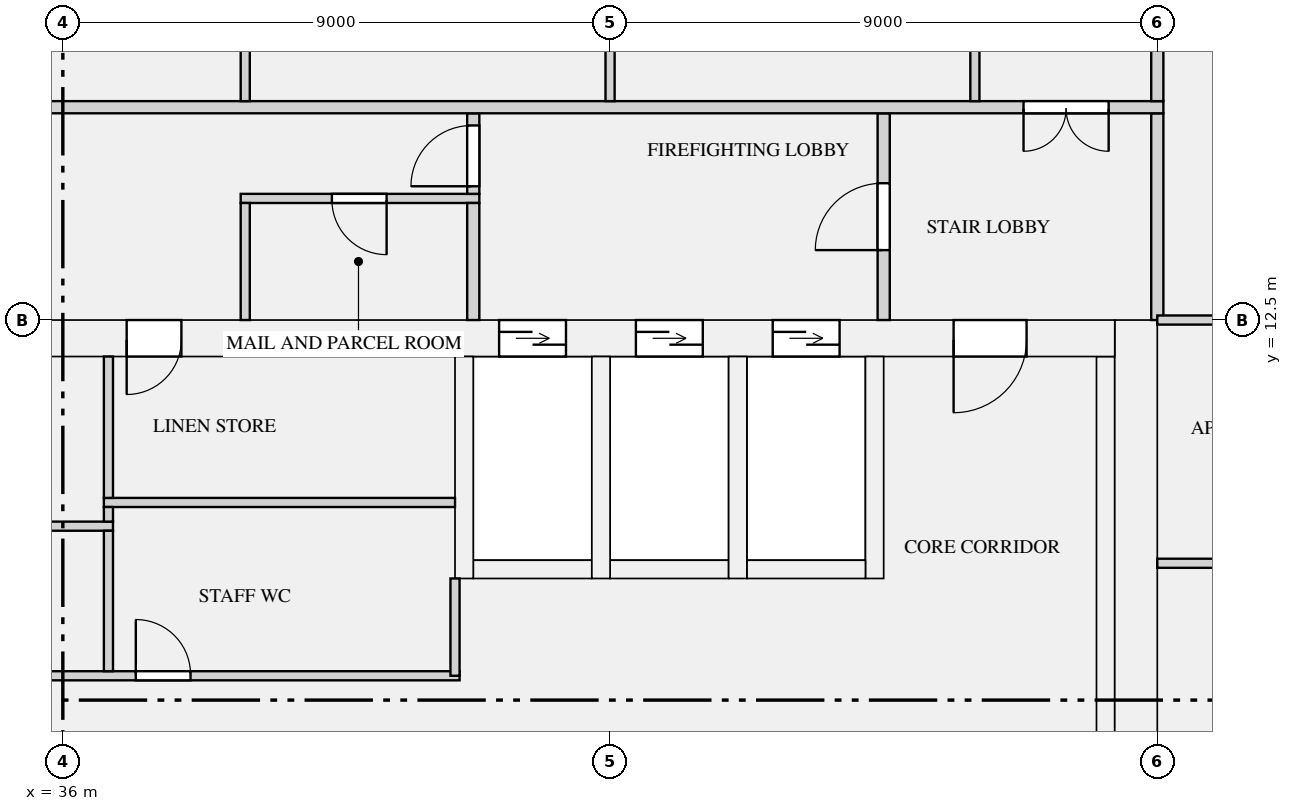
"""IFC4 building model, lengths in metres.
Left out: names, types, materials, properties, quantities, classifications, styles, units other than length and angle.
Written with IfcOpenShell. Run it as: python <this file> out.ifc"""

import sys

from ifc_helpers import new_model, si_unit, direction, frame, frame_2d, origin, place, context, subcontext, project, spatial, rectangle, extrude, element, fill, save


model = new_model("IFC4")
c1 = context("Model", 3, precision=1e-05, world=origin(), true_north=direction((0.0, 1.0)))
c2 = subcontext(c1, "Body", "Model", "MODEL_VIEW")
j1 = project(units=[si_unit("LENGTHUNIT", "METRE"), si_unit("PLANEANGLEUNIT", "RADIAN")], contexts=[c1])
p1 = place(None, origin())
s1 = spatial("IfcSite", under=j1, at=p1, CompositionType="ELEMENT")
p2 = place(p1, origin())
s2 = spatial("IfcBuilding", under=s1, at=p2, CompositionType="ELEMENT")
p3 = place(p2, frame((0.0, 0.0, 160.2)))
s3 = spatial("IfcBuildingStorey", under=s2, at=p3, CompositionType="ELEMENT", Elevation=160.2)
p4 = place(p3, frame((53.65, 0.0, 0.0), z_axis=(0.0, 0.0, 1.0), x_axis=(0.0, 1.0, 0.0)))
e1 = element("IfcWall", 1, at=p4, inside=s3, PredefinedType="SHEAR", context=c2, shape_type="SweptSolid", body=[
    extrude(rectangle(XDim=12.5, YDim=0.7, at=frame_2d((6.25, 0.0))), origin(), (0.0, 0.0, 1.0), 3.15),
])
p5 = place(p3, frame((18.7, 12.2, 0.0), z_axis=(0.0, 0.0, 1.0), x_axis=(1.0, 0.0, 0.0)))
e2 = element("IfcWall", 2, at=p5, inside=s3, PredefinedType="SHEAR", context=c2, shape_type="SweptSolid", body=[
    extrude(rectangle(XDim=34.6, YDim=0.6, at=frame_2d((17.3, 0.0))), origin(), (0.0, 0.0, 1.0), 3.15),
])
p6 = place(p5, frame((24.475, 0.0, 0.0)))
e3 = element("IfcOpeningElement", 3, at=p6, cuts=e2, PredefinedType="OPENING", context=c2, shape_type="SweptSolid", body=[
    extrude(rectangle(XDim=1.1, YDim=2.1, at=frame_2d((0.55, 1.05))), frame((0.0, 0.31, 0.0), z_axis=(0.0, -1.0, 0.0), x_axis=(1.0, 0.0, 0.0)), (0.0, 0.0, 1.0), 0.62),
])
p7 = place(p5, frame((26.725, 0.0, 0.0)))
e4 = element("IfcOpeningElement", 4, at=p7, cuts=e2, PredefinedType="OPENING", context=c2, shape_type="SweptSolid", body=[
    extrude(rectangle(XDim=1.1, YDim=2.1, at=frame_2d((0.55, 1.05))), frame((0.0, 0.31, 0.0), z_axis=(0.0, -1.0, 0.0), x_axis=(1.0, 0.0, 0.0)), (0.0, 0.0, 1.0), 0.62),
])
p8 = place(p5, frame((28.975, 0.0, 0.0)))
e5 = element("IfcOpeningElement", 5, at=p8, cuts=e2, PredefinedType="OPENING", context=c2, shape_type="SweptSolid", body=[
    extrude(rectangle(XDim=1.1, YDim=2.1, at=frame_2d((0.55, 1.05))), frame((0.0, 0.31, 0.0), z_axis=(0.0, -1.0, 0.0), x_axis=(1.0, 0.0, 0.0)), (0.0, 0.0, 1.0), 0.62),
])
p9 = place(p5, frame((4.85, 0.0, 0.0)))
e6 = element("IfcOpeningElement", 6, at=p9, cuts=e2, PredefinedType="OPENING", context=c2, shape_type="SweptSolid", body=[
    extrude(rectangle(XDim=0.9, YDim=2.1, at=frame_2d((0.45, 1.05))), frame((0.0, 0.31, 0.0), z_axis=(0.0, -1.0, 0.0), x_axis=(1.0, 0.0, 0.0)), (0.0, 0.0, 1.0), 0.62),
])
p10 = place(p5, frame((13.85, 0.0, 0.0)))
e7 = element("IfcOpeningElement", 7, at=p10, cuts=e2, PredefinedType="OPENING", context=c2, shape_type="SweptSolid", body=[
    extrude(rectangle(XDim=0.9, YDim=2.1, at=frame_2d((0.45, 1.05))), frame((0.0, 0.31, 0.0), z_axis=(0.0, -1.0, 0.0), x_axis=(1.0, 0.0, 0.0)), (0.0, 0.0, 1.0), 0.62),
])
p11 = place(p5, frame((18.35, 0.0, 0.0)))
e8 = element("IfcOpeningElement", 8, at=p11, cuts=e2, PredefinedType="OPENING", context=c2, shape_type="SweptSolid", body=[
    extrude(rectangle(XDim=0.9, YDim=2.1, at=frame_2d((0.45, 1.05))), frame((0.0, 0.31, 0.0), z_axis=(0.0, -1.0, 0.0), x_axis=(1.0, 0.0, 0.0)), (0.0, 0.0, 1.0), 0.62),
])
p12 = place(p5, frame((1.45, 0.0, 0.0)))
e9 = element("IfcOpeningElement", 9, at=p12, cuts=e2, PredefinedType="OPENING", context=c2, shape_type="SweptSolid", body=[
    extrude(rectangle(XDim=1.2, YDim=2.1, at=frame_2d((0.6, 1.05))), frame((0.0, 0.31, 0.0), z_axis=(0.0, -1.0, 0.0), x_axis=(1.0, 0.0, 0.0)), (0.0, 0.0, 1.0), 0.62),
])
p13 = place(p5, frame((31.95, 0.0, 0.0)))
e10 = element("IfcOpeningElement", 10, at=p13, cuts=e2, PredefinedType="OPENING", context=c2, shape_type="SweptSolid", body=[
    extrude(rectangle(XDim=1.2, YDim=2.1, at=frame_2d((0.6, 1.05))), frame((0.0, 0.31, 0.0), z_axis=(0.0, -1.0, 0.0), x_axis=(1.0, 0.0, 0.0)), (0.0, 0.0, 1.0), 0.62),
])
p14 = place(p3, frame((53.15, 1.0, 0.0), z_axis=(0.0, 0.0, 1.0), x_axis=(0.0, 1.0, 0.0)))
e11 = element("IfcWall", 11, at=p14, inside=s3, PredefinedType="SHEAR", context=c2, shape_type="SweptSolid", body=[
    extrude(rectangle(XDim=10.9, YDim=0.3, at=frame_2d((5.45, 0.0))), origin(), (0.0, 0.0, 1.0), 3.15),
])
p15 = place(p3, frame((42.75, 8.4, 0.0), z_axis=(0.0, 0.0, 1.0), x_axis=(1.0, 0.0, 0.0)))
e12 = element("IfcWall", 12, at=p15, inside=s3, PredefinedType="SHEAR", context=c2, shape_type="SweptSolid", body=[
    extrude(rectangle(XDim=1.95, YDim=0.3, at=frame_2d((0.975, 0.0))), origin(), (0.0, 0.0, 1.0), 3.15),
])
p16 = place(p3, frame((42.6, 8.25, 0.0), z_axis=(0.0, 0.0, 1.0), x_axis=(0.0, 1.0, 0.0)))
e13 = element("IfcWall", 13, at=p16, inside=s3, PredefinedType="SHEAR", context=c2, shape_type="SweptSolid", body=[
    extrude(rectangle(XDim=3.65, YDim=0.3, at=frame_2d((1.825, 0.0))), origin(), (0.0, 0.0, 1.0), 3.15),
])
p17 = place(p3, frame((45.0, 8.4, 0.0), z_axis=(0.0, 0.0, 1.0), x_axis=(1.0, 0.0, 0.0)))
e14 = element("IfcWall", 14, at=p17, inside=s3, PredefinedType="SHEAR", context=c2, shape_type="SweptSolid", body=[
    extrude(rectangle(XDim=1.95, YDim=0.3, at=frame_2d((0.975, 0.0))), origin(), (0.0, 0.0, 1.0), 3.15),
])
p18 = place(p3, frame((44.85, 8.25, 0.0), z_axis=(0.0, 0.0, 1.0), x_axis=(0.0, 1.0, 0.0)))
e15 = element("IfcWall", 15, at=p18, inside=s3, PredefinedType="SHEAR", context=c2, shape_type="SweptSolid", body=[
    extrude(rectangle(XDim=3.65, YDim=0.3, at=frame_2d((1.825, 0.0))), origin(), (0.0, 0.0, 1.0), 3.15),
])
p19 = place(p3, frame((47.25, 8.4, 0.0), z_axis=(0.0, 0.0, 1.0), x_axis=(1.0, 0.0, 0.0)))
e16 = element("IfcWall", 16, at=p19, inside=s3, PredefinedType="SHEAR", context=c2, shape_type="SweptSolid", body=[
    extrude(rectangle(XDim=1.95, YDim=0.3, at=frame_2d((0.975, 0.0))), origin(), (0.0, 0.0, 1.0), 3.15),
])
for number, where, z_axis, x_axis in (
    (17, (47.1, 8.25, 0.0), (0.0, 0.0, 1.0), (0.0, 1.0, 0.0)),
    (18, (49.35, 8.25, 0.0), (0.0, 0.0, 1.0), (0.0, 1.0, 0.0)),
):
    element("IfcWall", number, at=place(p3, frame(where, z_axis=z_axis, x_axis=x_axis)), inside=s3, PredefinedType="SHEAR", context=c2, shape_type="SweptSolid", body=[
        extrude(rectangle(XDim=3.65, YDim=0.3, at=frame_2d((1.825, 0.0))), origin(), (0.0, 0.0, 1.0), 3.15),
    ])
p20 = place(p3, frame((22.725, 6.65, 0.0), z_axis=(0.0, 0.0, 1.0), x_axis=(1.0, 0.0, 0.0)))
e19 = element("IfcWall", 19, at=p20, inside=s3, PredefinedType="PARTITIONING", context=c2, shape_type="SweptSolid", body=[
    extrude(rectangle(XDim=19.8, YDim=0.15, at=frame_2d((9.9, 0.0))), origin(), (0.0, 0.0, 1.0), 2.83),
])
p21 = place(p20, frame((0.825, 0.0, 0.0)))
e20 = element("IfcOpeningElement", 20, at=p21, cuts=e19, PredefinedType="OPENING", context=c2, shape_type="SweptSolid", body=[
    extrude(rectangle(XDim=0.9, YDim=2.1, at=frame_2d((0.45, 1.05))), frame((0.0, 0.085, 0.0), z_axis=(0.0, -1.0, 0.0), x_axis=(1.0, 0.0, 0.0)), (0.0, 0.0, 1.0), 0.17),
])
p22 = place(p20, frame((4.825, 0.0, 0.0)))
e21 = element("IfcOpeningElement", 21, at=p22, cuts=e19, PredefinedType="OPENING", context=c2, shape_type="SweptSolid", body=[
    extrude(rectangle(XDim=0.9, YDim=2.1, at=frame_2d((0.45, 1.05))), frame((0.0, 0.085, 0.0), z_axis=(0.0, -1.0, 0.0), x_axis=(1.0, 0.0, 0.0)), (0.0, 0.0, 1.0), 0.17),
])
p23 = place(p20, frame((9.825, 0.0, 0.0)))
e22 = element("IfcOpeningElement", 22, at=p23, cuts=e19, PredefinedType="OPENING", context=c2, shape_type="SweptSolid", body=[
    extrude(rectangle(XDim=0.9, YDim=2.1, at=frame_2d((0.45, 1.05))), frame((0.0, 0.085, 0.0), z_axis=(0.0, -1.0, 0.0), x_axis=(1.0, 0.0, 0.0)), (0.0, 0.0, 1.0), 0.17),
])
p24 = place(p20, frame((14.475, 0.0, 0.0)))
e23 = element("IfcOpeningElement", 23, at=p24, cuts=e19, PredefinedType="OPENING", context=c2, shape_type="SweptSolid", body=[
    extrude(rectangle(XDim=0.9, YDim=2.1, at=frame_2d((0.45, 1.05))), frame((0.0, 0.085, 0.0), z_axis=(0.0, -1.0, 0.0), x_axis=(1.0, 0.0, 0.0)), (0.0, 0.0, 1.0), 0.17),
])
p25 = place(p3, frame((22.725, 9.11, 0.0), z_axis=(0.0, 0.0, 1.0), x_axis=(1.0, 0.0, 0.0)))
e24 = element("IfcWall", 24, at=p25, inside=s3, PredefinedType="PARTITIONING", context=c2, shape_type="SweptSolid", body=[
    extrude(rectangle(XDim=14.1, YDim=0.15, at=frame_2d((7.05, 0.0))), origin(), (0.0, 0.0, 1.0), 2.83),
])
p26 = place(p3, frame((36.675, 9.5, 0.0), z_axis=(0.0, 0.0, 1.0), x_axis=(1.0, 0.0, 0.0)))
e25 = element("IfcWall", 25, at=p26, inside=s3, PredefinedType="PARTITIONING", context=c2, shape_type="SweptSolid", body=[
    extrude(rectangle(XDim=5.775, YDim=0.15, at=frame_2d((2.887, 0.0))), origin(), (0.0, 0.0, 1.0), 2.83),
])
p27 = place(p3, frame((38.925, 14.5, 0.0), z_axis=(0.0, 0.0, 1.0), x_axis=(1.0, 0.0, 0.0)))
e26 = element("IfcWall", 26, at=p27, inside=s3, PredefinedType="PARTITIONING", context=c2, shape_type="SweptSolid", body=[
    extrude(rectangle(XDim=3.925, YDim=0.15, at=frame_2d((1.962, 0.0))), origin(), (0.0, 0.0, 1.0), 2.83),
])
p28 = place(p27, frame((1.5, 0.0, 0.0)))
e27 = element("IfcOpeningElement", 27, at=p28, cuts=e26, PredefinedType="OPENING", context=c2, shape_type="SweptSolid", body=[
    extrude(rectangle(XDim=0.9, YDim=2.1, at=frame_2d((0.45, 1.05))), frame((0.0, 0.085, 0.0), z_axis=(0.0, -1.0, 0.0), x_axis=(1.0, 0.0, 0.0)), (0.0, 0.0, 1.0), 0.17),
])
p29 = place(p3, frame((42.45, 6.65, 0.0), z_axis=(0.0, 0.0, 1.0), x_axis=(0.0, 1.0, 0.0)))
e28 = element("IfcWall", 28, at=p29, inside=s3, PredefinedType="PARTITIONING", context=c2, shape_type="SweptSolid", body=[
    extrude(rectangle(XDim=1.6, YDim=0.15, at=frame_2d((0.8, 0.0))), origin(), (0.0, 0.0, 1.0), 2.83),
])
p30 = place(p3, frame((36.75, 6.725, 0.0), z_axis=(0.0, 0.0, 1.0), x_axis=(0.0, 1.0, 0.0)))
e29 = element("IfcWall", 29, at=p30, inside=s3, PredefinedType="PARTITIONING", context=c2, shape_type="SweptSolid", body=[
    extrude(rectangle(XDim=2.31, YDim=0.15, at=frame_2d((1.155, 0.0))), origin(), (0.0, 0.0, 1.0), 2.83),
])
p31 = place(p3, frame((36.75, 9.185, 0.0), z_axis=(0.0, 0.0, 1.0), x_axis=(0.0, 1.0, 0.0)))
e30 = element("IfcWall", 30, at=p31, inside=s3, PredefinedType="PARTITIONING", context=c2, shape_type="SweptSolid", body=[
    extrude(rectangle(XDim=0.24, YDim=0.15, at=frame_2d((0.12, 0.0))), origin(), (0.0, 0.0, 1.0), 2.83),
])
p32 = place(p3, frame((36.75, 9.575, 0.0), z_axis=(0.0, 0.0, 1.0), x_axis=(0.0, 1.0, 0.0)))
e31 = element("IfcWall", 31, at=p32, inside=s3, PredefinedType="PARTITIONING", context=c2, shape_type="SweptSolid", body=[
    extrude(rectangle(XDim=2.325, YDim=0.15, at=frame_2d((1.163, 0.0))), origin(), (0.0, 0.0, 1.0), 2.83),
])
p33 = place(p3, frame((39.0, 12.5, 0.0), z_axis=(0.0, 0.0, 1.0), x_axis=(0.0, 1.0, 0.0)))
e32 = element("IfcWall", 32, at=p33, inside=s3, PredefinedType="PARTITIONING", context=c2, shape_type="SweptSolid", body=[
    extrude(rectangle(XDim=1.925, YDim=0.15, at=frame_2d((0.962, 0.0))), origin(), (0.0, 0.0, 1.0), 2.83),
])
p34 = place(p3, frame((42.75, 12.5, 0.0), z_axis=(0.0, 0.0, 1.0), x_axis=(0.0, 1.0, 0.0)))
e33 = element("IfcWall", 33, at=p34, inside=s3, PredefinedType="PARTITIONING", context=c2, shape_type="SweptSolid", body=[
    extrude(rectangle(XDim=1.925, YDim=0.2, at=frame_2d((0.962, 0.0))), origin(), (0.0, 0.0, 1.0), 2.83),
])
p35 = place(p3, frame((49.5, 12.5, 0.0), z_axis=(0.0, 0.0, 1.0), x_axis=(0.0, 1.0, 0.0)))
e34 = element("IfcWall", 34, at=p35, inside=s3, PredefinedType="PARTITIONING", context=c2, shape_type="SweptSolid", body=[
    extrude(rectangle(XDim=3.4, YDim=0.2, at=frame_2d((1.7, 0.0))), origin(), (0.0, 0.0, 1.0), 2.83),
])
p36 = place(p35, frame((1.15, 0.0, 0.0)))
e35 = element("IfcOpeningElement", 35, at=p36, cuts=e34, PredefinedType="OPENING", context=c2, shape_type="SweptSolid", body=[
    extrude(rectangle(XDim=1.1, YDim=2.1, at=frame_2d((0.55, 1.05))), frame((0.0, 0.11, 0.0), z_axis=(0.0, -1.0, 0.0), x_axis=(1.0, 0.0, 0.0)), (0.0, 0.0, 1.0), 0.22),
])
p37 = place(p3, frame((54.0, 12.5, 0.0), z_axis=(0.0, 0.0, 1.0), x_axis=(0.0, 1.0, 0.0)))
e36 = element("IfcWall", 36, at=p37, inside=s3, PredefinedType="PARTITIONING", context=c2, shape_type="SweptSolid", body=[
    extrude(rectangle(XDim=3.4, YDim=0.2, at=frame_2d((1.7, 0.0))), origin(), (0.0, 0.0, 1.0), 2.83),
])
p38 = place(p3, frame((42.75, 14.575, 0.0), z_axis=(0.0, 0.0, 1.0), x_axis=(0.0, 1.0, 0.0)))
e37 = element("IfcWall", 37, at=p38, inside=s3, PredefinedType="PARTITIONING", context=c2, shape_type="SweptSolid", body=[
    extrude(rectangle(XDim=1.325, YDim=0.2, at=frame_2d((0.663, 0.0))), origin(), (0.0, 0.0, 1.0), 2.83),
])
p39 = place(p38, frame((0.125, 0.0, 0.0)))
e38 = element("IfcOpeningElement", 38, at=p39, cuts=e37, PredefinedType="OPENING", context=c2, shape_type="SweptSolid", body=[
    extrude(rectangle(XDim=1.0, YDim=2.1, at=frame_2d((0.5, 1.05))), frame((0.0, 0.11, 0.0), z_axis=(0.0, -1.0, 0.0), x_axis=(1.0, 0.0, 0.0)), (0.0, 0.0, 1.0), 0.22),
])
p40 = place(p3, frame((54.0, 8.5, 0.0), z_axis=(0.0, 0.0, 1.0), x_axis=(1.0, 0.0, 0.0)))
e39 = element("IfcWall", 39, at=p40, inside=s3, PredefinedType="PARTITIONING", context=c2, shape_type="SweptSolid", body=[
    extrude(rectangle(XDim=17.3, YDim=0.15, at=frame_2d((8.65, 0.0))), origin(), (0.0, 0.0, 1.0), 2.83),
])
p41 = place(p40, frame((3.75, 0.0, 0.0)))
e40 = element("IfcOpeningElement", 40, at=p41, cuts=e39, PredefinedType="OPENING", context=c2, shape_type="SweptSolid", body=[
    extrude(rectangle(XDim=1.5, YDim=2.1, at=frame_2d((0.75, 1.05))), frame((0.0, 0.085, 0.0), z_axis=(0.0, -1.0, 0.0), x_axis=(1.0, 0.0, 0.0)), (0.0, 0.0, 1.0), 0.17),
])
p42 = place(p40, frame((10.8, 0.0, 0.0)))
e41 = element("IfcOpeningElement", 41, at=p42, cuts=e39, PredefinedType="OPENING", context=c2, shape_type="SweptSolid", body=[
    extrude(rectangle(XDim=0.9, YDim=2.1, at=frame_2d((0.45, 1.05))), frame((0.0, 0.085, 0.0), z_axis=(0.0, -1.0, 0.0), x_axis=(1.0, 0.0, 0.0)), (0.0, 0.0, 1.0), 0.17),
])
p43 = place(p3, frame((54.0, 12.5, 0.0), z_axis=(0.0, 0.0, 1.0), x_axis=(1.0, 0.0, 0.0)))
e42 = element("IfcWall", 42, at=p43, inside=s3, PredefinedType="PARTITIONING", context=c2, shape_type="SweptSolid", body=[
    extrude(rectangle(XDim=17.3, YDim=0.15, at=frame_2d((8.65, 0.0))), origin(), (0.0, 0.0, 1.0), 2.83),
])
p44 = place(p43, frame((1.5, 0.0, 0.0)))
e43 = element("IfcOpeningElement", 43, at=p44, cuts=e42, PredefinedType="OPENING", context=c2, shape_type="SweptSolid", body=[
    extrude(rectangle(XDim=1.5, YDim=2.1, at=frame_2d((0.75, 1.05))), frame((0.0, 0.085, 0.0), z_axis=(0.0, -1.0, 0.0), x_axis=(1.0, 0.0, 0.0)), (0.0, 0.0, 1.0), 0.17),
])
p45 = place(p43, frame((12.75, 0.0, 0.0)))
e44 = element("IfcOpeningElement", 44, at=p45, cuts=e42, PredefinedType="OPENING", context=c2, shape_type="SweptSolid", body=[
    extrude(rectangle(XDim=1.5, YDim=2.1, at=frame_2d((0.75, 1.05))), frame((0.0, 0.085, 0.0), z_axis=(0.0, -1.0, 0.0), x_axis=(1.0, 0.0, 0.0)), (0.0, 0.0, 1.0), 0.17),
])
p46 = place(p3, frame((17.9, 16.0, 0.0), z_axis=(0.0, 0.0, 1.0), x_axis=(1.0, 0.0, 0.0)))
e45 = element("IfcWall", 45, at=p46, inside=s3, PredefinedType="PARTITIONING", context=c2, shape_type="SweptSolid", body=[
    extrude(rectangle(XDim=36.2, YDim=0.2, at=frame_2d((18.1, 0.0))), origin(), (0.0, 0.0, 1.0), 2.83),
])
p47 = place(p46, frame((0.9, 0.0, 0.0)))
e46 = element("IfcOpeningElement", 46, at=p47, cuts=e45, PredefinedType="OPENING", context=c2, shape_type="SweptSolid", body=[
    extrude(rectangle(XDim=1.4, YDim=2.1, at=frame_2d((0.7, 1.05))), frame((0.0, 0.11, 0.0), z_axis=(0.0, -1.0, 0.0), x_axis=(1.0, 0.0, 0.0)), (0.0, 0.0, 1.0), 0.22),
])
p48 = place(p46, frame((33.9, 0.0, 0.0)))
e47 = element("IfcOpeningElement", 47, at=p48, cuts=e45, PredefinedType="OPENING", context=c2, shape_type="SweptSolid", body=[
    extrude(rectangle(XDim=1.4, YDim=2.1, at=frame_2d((0.7, 1.05))), frame((0.0, 0.11, 0.0), z_axis=(0.0, -1.0, 0.0), x_axis=(1.0, 0.0, 0.0)), (0.0, 0.0, 1.0), 0.22),
])
p49 = place(p3, frame((54.0, 16.1, 0.0), z_axis=(0.0, 0.0, 1.0), x_axis=(0.0, 1.0, 0.0)))
e48 = element("IfcWall", 48, at=p49, inside=s3, PredefinedType="PARTITIONING", context=c2, shape_type="SweptSolid", body=[
    extrude(rectangle(XDim=7.8, YDim=0.2, at=frame_2d((3.9, 0.0))), origin(), (0.0, 0.0, 1.0), 2.83),
])
p50 = place(p49, frame((1.85, 0.0, 0.0)))
e49 = element("IfcOpeningElement", 49, at=p50, cuts=e48, PredefinedType="OPENING", context=c2, shape_type="SweptSolid", body=[
    extrude(rectangle(XDim=1.1, YDim=2.1, at=frame_2d((0.55, 1.05))), frame((0.0, 0.11, 0.0), z_axis=(0.0, -1.0, 0.0), x_axis=(1.0, 0.0, 0.0)), (0.0, 0.0, 1.0), 0.22),
])
for number, where, z_axis, x_axis in (
    (50, (51.0, 16.1, 0.0), (0.0, 0.0, 1.0), (0.0, 1.0, 0.0)),
    (51, (39.0, 16.1, 0.0), (0.0, 0.0, 1.0), (0.0, 1.0, 0.0)),
    (52, (45.0, 16.1, 0.0), (0.0, 0.0, 1.0), (0.0, 1.0, 0.0)),
):
    element("IfcWall", number, at=place(p3, frame(where, z_axis=z_axis, x_axis=x_axis)), inside=s3, PredefinedType="PARTITIONING", context=c2, shape_type="SweptSolid", body=[
        extrude(rectangle(XDim=4.825, YDim=0.15, at=frame_2d((2.413, 0.0))), origin(), (0.0, 0.0, 1.0), 2.83),
    ])
p51 = place(p6, origin())
e53 = element("IfcDoor", 53, at=p51, inside=s3, OperationType="DOUBLE_DOOR_SLIDING", PredefinedType="DOOR", context=c2, shape_type="SweptSolid", body=[
    extrude(rectangle(XDim=1.1, YDim=2.1, at=frame_2d((0.55, 1.05))), frame((0.0, 0.025, 0.0), z_axis=(0.0, -1.0, 0.0), x_axis=(1.0, 0.0, 0.0)), (0.0, 0.0, 1.0), 0.05),
])
fill(e3, e53)
p52 = place(p7, origin())
e54 = element("IfcDoor", 54, at=p52, inside=s3, OperationType="DOUBLE_DOOR_SLIDING", PredefinedType="DOOR", context=c2, shape_type="SweptSolid", body=[
    extrude(rectangle(XDim=1.1, YDim=2.1, at=frame_2d((0.55, 1.05))), frame((0.0, 0.025, 0.0), z_axis=(0.0, -1.0, 0.0), x_axis=(1.0, 0.0, 0.0)), (0.0, 0.0, 1.0), 0.05),
])
fill(e4, e54)
p53 = place(p8, origin())
e55 = element("IfcDoor", 55, at=p53, inside=s3, OperationType="DOUBLE_DOOR_SLIDING", PredefinedType="DOOR", context=c2, shape_type="SweptSolid", body=[
    extrude(rectangle(XDim=1.1, YDim=2.1, at=frame_2d((0.55, 1.05))), frame((0.0, 0.025, 0.0), z_axis=(0.0, -1.0, 0.0), x_axis=(1.0, 0.0, 0.0)), (0.0, 0.0, 1.0), 0.05),
])
fill(e5, e55)
p54 = place(p28, frame((0.9, 0.0, 0.0), z_axis=(0.0, 0.0, 1.0), x_axis=(-1.0, 0.0, 0.0)))
e56 = element("IfcDoor", 56, at=p54, inside=s3, OperationType="SINGLE_SWING_LEFT", PredefinedType="DOOR", context=c2, shape_type="SweptSolid", body=[
    extrude(rectangle(XDim=0.9, YDim=2.1, at=frame_2d((0.45, 1.05))), frame((0.0, 0.025, 0.0), z_axis=(0.0, -1.0, 0.0), x_axis=(1.0, 0.0, 0.0)), (0.0, 0.0, 1.0), 0.05),
])
fill(e27, e56)
p55 = place(p24, origin())
e57 = element("IfcDoor", 57, at=p55, inside=s3, OperationType="SINGLE_SWING_LEFT", PredefinedType="DOOR", context=c2, shape_type="SweptSolid", body=[
    extrude(rectangle(XDim=0.9, YDim=2.1, at=frame_2d((0.45, 1.05))), frame((0.0, 0.025, 0.0), z_axis=(0.0, -1.0, 0.0), x_axis=(1.0, 0.0, 0.0)), (0.0, 0.0, 1.0), 0.05),
])
fill(e23, e57)
p56 = place(p11, frame((0.9, 0.0, 0.0), z_axis=(0.0, 0.0, 1.0), x_axis=(-1.0, 0.0, 0.0)))
e58 = element("IfcDoor", 58, at=p56, inside=s3, OperationType="SINGLE_SWING_RIGHT", PredefinedType="DOOR", context=c2, shape_type="SweptSolid", body=[
    extrude(rectangle(XDim=0.9, YDim=2.1, at=frame_2d((0.45, 1.05))), frame((0.0, 0.025, 0.0), z_axis=(0.0, -1.0, 0.0), x_axis=(1.0, 0.0, 0.0)), (0.0, 0.0, 1.0), 0.05),
])
fill(e8, e58)
p57 = place(p13, frame((1.2, 0.0, 0.0), z_axis=(0.0, 0.0, 1.0), x_axis=(-1.0, 0.0, 0.0)))
e59 = element("IfcDoor", 59, at=p57, inside=s3, OperationType="SINGLE_SWING_RIGHT", PredefinedType="DOOR", context=c2, shape_type="SweptSolid", body=[
    extrude(rectangle(XDim=1.2, YDim=2.1, at=frame_2d((0.6, 1.05))), frame((0.0, 0.025, 0.0), z_axis=(0.0, -1.0, 0.0), x_axis=(1.0, 0.0, 0.0)), (0.0, 0.0, 1.0), 0.05),
])
fill(e10, e59)
p58 = place(p39, origin())
e60 = element("IfcDoor", 60, at=p58, inside=s3, OperationType="SINGLE_SWING_LEFT", PredefinedType="DOOR", context=c2, shape_type="SweptSolid", body=[
    extrude(rectangle(XDim=1.0, YDim=2.1, at=frame_2d((0.5, 1.05))), frame((0.0, 0.025, 0.0), z_axis=(0.0, -1.0, 0.0), x_axis=(1.0, 0.0, 0.0)), (0.0, 0.0, 1.0), 0.05),
])
fill(e38, e60)
p59 = place(p36, origin())
e61 = element("IfcDoor", 61, at=p59, inside=s3, OperationType="SINGLE_SWING_LEFT", PredefinedType="DOOR", context=c2, shape_type="SweptSolid", body=[
    extrude(rectangle(XDim=1.1, YDim=2.1, at=frame_2d((0.55, 1.05))), frame((0.0, 0.025, 0.0), z_axis=(0.0, -1.0, 0.0), x_axis=(1.0, 0.0, 0.0)), (0.0, 0.0, 1.0), 0.05),
])
fill(e35, e61)
p60 = place(p48, frame((1.4, 0.0, 0.0), z_axis=(0.0, 0.0, 1.0), x_axis=(-1.0, 0.0, 0.0)))
e62 = element("IfcDoor", 62, at=p60, inside=s3, OperationType="DOUBLE_DOOR_SINGLE_SWING", PredefinedType="DOOR", context=c2, shape_type="SweptSolid", body=[
    extrude(rectangle(XDim=1.4, YDim=2.1, at=frame_2d((0.7, 1.05))), frame((0.0, 0.025, 0.0), z_axis=(0.0, -1.0, 0.0), x_axis=(1.0, 0.0, 0.0)), (0.0, 0.0, 1.0), 0.05),
])
fill(e47, e62)
save(model, sys.argv[1])
